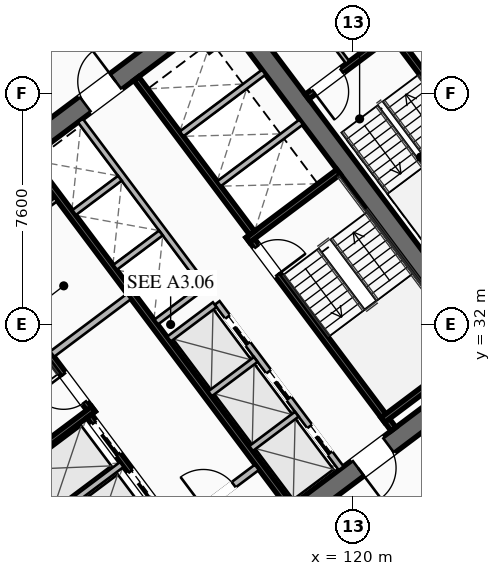
"""IFC4 building model, lengths in metres.
Left out: names, types, materials, properties, quantities, classifications, styles, units other than length and angle.
Written with IfcOpenShell. Run it as: python <this file> out.ifc"""

import sys

from ifc_helpers import new_model, si_unit, direction, frame, frame_2d, origin, place, context, subcontext, project, spatial, rectangle, extrude, element, fill, save


model = new_model("IFC4")
c1 = context("Model", 3, precision=1e-05, world=origin(), true_north=direction((0.0, 1.0)))
c2 = subcontext(c1, "Body", "Model", "MODEL_VIEW")
j1 = project(units=[si_unit("LENGTHUNIT", "METRE"), si_unit("PLANEANGLEUNIT", "RADIAN")], contexts=[c1])
p1 = place(None, origin())
s1 = spatial("IfcSite", under=j1, at=p1, CompositionType="ELEMENT")
p2 = place(p1, origin())
s2 = spatial("IfcBuilding", under=s1, at=p2, CompositionType="ELEMENT")
p3 = place(p2, frame((0.0, 0.0, 35.25)))
s3 = spatial("IfcBuildingStorey", under=s2, at=p3, CompositionType="ELEMENT", Elevation=35.25)
for number, where, z_axis, x_axis in (
    (1, (112.476, 21.107, 0.0), (0.0, 0.0, 1.0), (-0.6, 0.8, 0.0)),
    (2, (115.524, 42.893, 0.0), (0.0, 0.0, 1.0), (0.6, -0.8, 0.0)),
):
    element("IfcWall", number, at=place(p3, frame(where, z_axis=z_axis, x_axis=x_axis)), inside=s3, PredefinedType="SHEAR", context=c2, shape_type="SweptSolid", body=[
        extrude(rectangle(XDim=15.6, YDim=0.65, at=frame_2d((7.8, 0.0))), origin(), (0.0, 0.0, 1.0), 3.55),
    ])
p4 = place(p3, frame((124.429, 30.478, 0.0), z_axis=(0.0, 0.0, 1.0), x_axis=(-0.799998028465, -0.600002628705, 0.0)))
e3 = element("IfcWall", 3, at=p4, inside=s3, PredefinedType="SHEAR", context=c2, shape_type="SweptSolid", body=[
    extrude(rectangle(XDim=14.86, YDim=0.65, at=frame_2d((7.43, 0.0))), origin(), (0.0, 0.0, 1.0), 3.55),
])
p5 = place(p4, frame((9.13, 0.0, 0.0)))
e4 = element("IfcOpeningElement", 4, at=p5, cuts=e3, PredefinedType="OPENING", context=c2, shape_type="SweptSolid", body=[
    extrude(rectangle(XDim=1.25, YDim=2.25, at=frame_2d((0.625, 1.125))), frame((0.0, 0.335, 0.0), z_axis=(0.0, -1.0, 0.0), x_axis=(1.0, 0.0, 0.0)), (0.0, 0.0, 1.0), 0.67),
])
p6 = place(p4, frame((4.08, 0.0, 0.0)))
e5 = element("IfcOpeningElement", 5, at=p6, cuts=e3, PredefinedType="OPENING", context=c2, shape_type="SweptSolid", body=[
    extrude(rectangle(XDim=1.25, YDim=2.25, at=frame_2d((0.625, 1.125))), frame((0.0, 0.335, 0.0), z_axis=(0.0, -1.0, 0.0), x_axis=(1.0, 0.0, 0.0)), (0.0, 0.0, 1.0), 0.67),
])
p7 = place(p3, frame((103.571, 33.522, 0.0), z_axis=(0.0, 0.0, 1.0), x_axis=(0.799998028465, 0.600002628705, 0.0)))
e6 = element("IfcWall", 6, at=p7, inside=s3, PredefinedType="SHEAR", context=c2, shape_type="SweptSolid", body=[
    extrude(rectangle(XDim=14.86, YDim=0.65, at=frame_2d((7.43, 0.0))), origin(), (0.0, 0.0, 1.0), 3.55),
])
p8 = place(p7, frame((4.48, 0.0, 0.0)))
e7 = element("IfcOpeningElement", 7, at=p8, cuts=e6, PredefinedType="OPENING", context=c2, shape_type="SweptSolid", body=[
    extrude(rectangle(XDim=1.25, YDim=2.25, at=frame_2d((0.625, 1.125))), frame((0.0, 0.335, 0.0), z_axis=(0.0, -1.0, 0.0), x_axis=(1.0, 0.0, 0.0)), (0.0, 0.0, 1.0), 0.67),
])
p9 = place(p7, frame((9.53, 0.0, 0.0)))
e8 = element("IfcOpeningElement", 8, at=p9, cuts=e6, PredefinedType="OPENING", context=c2, shape_type="SweptSolid", body=[
    extrude(rectangle(XDim=1.25, YDim=2.25, at=frame_2d((0.625, 1.125))), frame((0.0, 0.335, 0.0), z_axis=(0.0, -1.0, 0.0), x_axis=(1.0, 0.0, 0.0)), (0.0, 0.0, 1.0), 0.67),
])
p10 = place(p3, frame((111.44, 29.08, 0.0), z_axis=(0.0, 0.0, 1.0), x_axis=(-0.600009827119, 0.799992629566, 0.0)))
e9 = element("IfcWall", 9, at=p10, inside=s3, PredefinedType="SHEAR", context=c2, shape_type="SweptSolid", body=[
    extrude(rectangle(XDim=7.95, YDim=0.2, at=frame_2d((3.975, 0.0))), origin(), (0.0, 0.0, 1.0), 3.35),
])
p11 = place(p10, frame((0.45, 0.0, 0.0)))
e10 = element("IfcOpeningElement", 10, at=p11, cuts=e9, PredefinedType="OPENING", context=c2, shape_type="SweptSolid", body=[
    extrude(rectangle(XDim=1.15, YDim=2.2, at=frame_2d((0.575, 1.1))), frame((0.0, 0.11, 0.0), z_axis=(0.0, -1.0, 0.0), x_axis=(1.0, 0.0, 0.0)), (0.0, 0.0, 1.0), 0.22),
])
p12 = place(p3, frame((108.476, 26.982, 0.0), z_axis=(0.0, 0.0, 1.0), x_axis=(0.799984290658, 0.600020945218, 0.0)))
e11 = element("IfcWall", 11, at=p12, inside=s3, PredefinedType="SHEAR", context=c2, shape_type="SweptSolid", body=[
    extrude(rectangle(XDim=3.73, YDim=0.2, at=frame_2d((1.865, 0.0))), origin(), (0.0, 0.0, 1.0), 3.35),
])
p13 = place(p3, frame((116.56, 34.92, 0.0), z_axis=(0.0, 0.0, 1.0), x_axis=(0.600009827119, -0.799992629566, 0.0)))
e12 = element("IfcWall", 12, at=p13, inside=s3, PredefinedType="SHEAR", context=c2, shape_type="SweptSolid", body=[
    extrude(rectangle(XDim=7.95, YDim=0.2, at=frame_2d((3.975, 0.0))), origin(), (0.0, 0.0, 1.0), 3.35),
])
p14 = place(p13, frame((0.45, 0.0, 0.0)))
e13 = element("IfcOpeningElement", 13, at=p14, cuts=e12, PredefinedType="OPENING", context=c2, shape_type="SweptSolid", body=[
    extrude(rectangle(XDim=1.15, YDim=2.2, at=frame_2d((0.575, 1.1))), frame((0.0, 0.11, 0.0), z_axis=(0.0, -1.0, 0.0), x_axis=(1.0, 0.0, 0.0)), (0.0, 0.0, 1.0), 0.22),
])
for number, where, z_axis, x_axis in (
    (14, (116.54, 34.78, 0.0), (0.0, 0.0, 1.0), (0.8, 0.6, 0.0)),
    (15, (120.98, 28.86, 0.0), (0.0, 0.0, 1.0), (0.8, 0.6, 0.0)),
):
    element("IfcWall", number, at=place(p3, frame(where, z_axis=z_axis, x_axis=x_axis)), inside=s3, PredefinedType="SHEAR", context=c2, shape_type="SweptSolid", body=[
        extrude(rectangle(XDim=3.73, YDim=0.2, at=frame_2d((1.865, 0.0))), origin(), (0.0, 0.0, 1.0), 3.35),
    ])
p15 = place(p3, frame((117.938, 26.016, 0.0), z_axis=(0.0, 0.0, 1.0), x_axis=(-0.600005463273, 0.799995902516, 0.0)))
e16 = element("IfcWall", 16, at=p15, inside=s3, PredefinedType="SHEAR", context=c2, shape_type="SweptSolid", body=[
    extrude(rectangle(XDim=14.3, YDim=0.2, at=frame_2d((7.15, 0.0))), origin(), (0.0, 0.0, 1.0), 3.35),
])
p16 = place(p3, frame((110.104, 31.028, 0.0), z_axis=(0.0, 0.0, 1.0), x_axis=(0.800018601094, 0.59997519774, 0.0)))
e17 = element("IfcWall", 17, at=p16, inside=s3, PredefinedType="SOLIDWALL", context=c2, shape_type="SweptSolid", body=[
    extrude(rectangle(XDim=3.15, YDim=0.22, at=frame_2d((1.575, 0.0))), origin(), (0.0, 0.0, 1.0), 2.703),
])
p17 = place(p3, frame((114.316, 25.412, 0.0), z_axis=(0.0, 0.0, 1.0), x_axis=(0.800018601094, 0.59997519774, 0.0)))
e18 = element("IfcWall", 18, at=p17, inside=s3, PredefinedType="SOLIDWALL", context=c2, shape_type="SweptSolid", body=[
    extrude(rectangle(XDim=3.15, YDim=0.22, at=frame_2d((1.575, 0.0))), origin(), (0.0, 0.0, 1.0), 2.703),
])
p18 = place(p17, frame((0.95, 0.0, 0.0)))
e19 = element("IfcOpeningElement", 19, at=p18, cuts=e18, PredefinedType="OPENING", context=c2, shape_type="SweptSolid", body=[
    extrude(rectangle(XDim=1.25, YDim=2.25, at=frame_2d((0.625, 1.125))), frame((0.0, 0.12, 0.0), z_axis=(0.0, -1.0, 0.0), x_axis=(1.0, 0.0, 0.0)), (0.0, 0.0, 1.0), 0.24),
])
p19 = place(p3, frame((115.13, 23.91, 0.0), z_axis=(0.0, 0.0, 1.0), x_axis=(-0.599975393228, 0.800018454488, 0.0)))
e20 = element("IfcWall", 20, at=p19, inside=s3, PredefinedType="SHEAR", context=c2, shape_type="SweptSolid", body=[
    extrude(rectangle(XDim=6.35, YDim=0.2, at=frame_2d((3.175, 0.0))), origin(), (0.0, 0.0, 1.0), 3.35),
])
p20 = place(p19, frame((4.775, 0.0, 0.0)))
e21 = element("IfcOpeningElement", 21, at=p20, cuts=e20, PredefinedType="OPENING", context=c2, shape_type="SweptSolid", body=[
    extrude(rectangle(XDim=1.3, YDim=2.25, at=frame_2d((0.65, 1.125))), frame((0.0, 0.11, 0.0), z_axis=(0.0, -1.0, 0.0), x_axis=(1.0, 0.0, 0.0)), (0.0, 0.0, 1.0), 0.22),
])
p21 = place(p19, frame((2.775, 0.0, 0.0)))
e22 = element("IfcOpeningElement", 22, at=p21, cuts=e20, PredefinedType="OPENING", context=c2, shape_type="SweptSolid", body=[
    extrude(rectangle(XDim=1.3, YDim=2.25, at=frame_2d((0.65, 1.125))), frame((0.0, 0.11, 0.0), z_axis=(0.0, -1.0, 0.0), x_axis=(1.0, 0.0, 0.0)), (0.0, 0.0, 1.0), 0.22),
])
p22 = place(p19, frame((0.575, 0.0, 0.0)))
e23 = element("IfcOpeningElement", 23, at=p22, cuts=e20, PredefinedType="OPENING", context=c2, shape_type="SweptSolid", body=[
    extrude(rectangle(XDim=1.3, YDim=2.25, at=frame_2d((0.65, 1.125))), frame((0.0, 0.11, 0.0), z_axis=(0.0, -1.0, 0.0), x_axis=(1.0, 0.0, 0.0)), (0.0, 0.0, 1.0), 0.22),
])
p23 = place(p3, frame((109.688, 25.366, 0.0), z_axis=(0.0, 0.0, 1.0), x_axis=(0.8, 0.6, 0.0)))
e24 = element("IfcWall", 24, at=p23, inside=s3, PredefinedType="SOLIDWALL", context=c2, shape_type="SweptSolid", body=[
    extrude(rectangle(XDim=3.38, YDim=0.2, at=frame_2d((1.69, 0.0))), origin(), (0.0, 0.0, 1.0), 3.35),
])
p24 = place(p3, frame((112.87, 40.09, 0.0), z_axis=(0.0, 0.0, 1.0), x_axis=(0.599975393228, -0.800018454488, 0.0)))
e25 = element("IfcWall", 25, at=p24, inside=s3, PredefinedType="SHEAR", context=c2, shape_type="SweptSolid", body=[
    extrude(rectangle(XDim=6.35, YDim=0.2, at=frame_2d((3.175, 0.0))), origin(), (0.0, 0.0, 1.0), 3.35),
])
for number, where, z_axis, x_axis in (
    (26, (115.59, 36.63, 0.0), (0.0, 0.0, 1.0), (0.8, 0.6, 0.0)),
    (27, (114.36, 38.27, 0.0), (0.0, 0.0, 1.0), (0.8, 0.6, 0.0)),
):
    element("IfcWall", number, at=place(p3, frame(where, z_axis=z_axis, x_axis=x_axis)), inside=s3, PredefinedType="SOLIDWALL", context=c2, shape_type="SweptSolid", body=[
        extrude(rectangle(XDim=3.38, YDim=0.2, at=frame_2d((1.69, 0.0))), origin(), (0.0, 0.0, 1.0), 3.35),
    ])
p25 = place(p3, frame((107.71, 34.22, 0.0), z_axis=(0.0, 0.0, 1.0), x_axis=(0.799981399002, 0.60002480053, 0.0)))
e28 = element("IfcWall", 28, at=p25, inside=s3, PredefinedType="PARTITIONING", context=c2, shape_type="SweptSolid", body=[
    extrude(rectangle(XDim=3.15, YDim=0.135, at=frame_2d((1.575, 0.0))), origin(), (0.0, 0.0, 1.0), 2.703),
])
p26 = place(p25, frame((1.05, 0.0, 0.0)))
e29 = element("IfcOpeningElement", 29, at=p26, cuts=e28, PredefinedType="OPENING", context=c2, shape_type="SweptSolid", body=[
    extrude(rectangle(XDim=1.05, YDim=2.2, at=frame_2d((0.525, 1.1))), frame((0.0, 0.077, 0.0), z_axis=(0.0, -1.0, 0.0), x_axis=(1.0, 0.0, 0.0)), (0.0, 0.0, 1.0), 0.155),
])
p27 = place(p3, frame((119.61, 27.27, 0.0), z_axis=(0.0, 0.0, 1.0), x_axis=(-0.600011488909, 0.79999138319, 0.0)))
e30 = element("IfcWall", 30, at=p27, inside=s3, PredefinedType="SOLIDWALL", context=c2, shape_type="SweptSolid", body=[
    extrude(rectangle(XDim=6.8, YDim=0.2, at=frame_2d((3.4, 0.0))), origin(), (0.0, 0.0, 1.0), 3.35),
])
p28 = place(p27, frame((0.625, 0.0, 0.0)))
e31 = element("IfcOpeningElement", 31, at=p28, cuts=e30, PredefinedType="OPENING", context=c2, shape_type="SweptSolid", body=[
    extrude(rectangle(XDim=1.1, YDim=2.2, at=frame_2d((0.55, 1.1))), frame((0.0, 0.11, 0.0), z_axis=(0.0, -1.0, 0.0), x_axis=(1.0, 0.0, 0.0)), (0.0, 0.0, 1.0), 0.22),
])
p29 = place(p27, frame((2.875, 0.0, 0.0)))
e32 = element("IfcOpeningElement", 32, at=p29, cuts=e30, PredefinedType="OPENING", context=c2, shape_type="SweptSolid", body=[
    extrude(rectangle(XDim=1.1, YDim=2.2, at=frame_2d((0.55, 1.1))), frame((0.0, 0.11, 0.0), z_axis=(0.0, -1.0, 0.0), x_axis=(1.0, 0.0, 0.0)), (0.0, 0.0, 1.0), 0.22),
])
p30 = place(p27, frame((5.125, 0.0, 0.0)))
e33 = element("IfcOpeningElement", 33, at=p30, cuts=e30, PredefinedType="OPENING", context=c2, shape_type="SweptSolid", body=[
    extrude(rectangle(XDim=1.1, YDim=2.2, at=frame_2d((0.55, 1.1))), frame((0.0, 0.11, 0.0), z_axis=(0.0, -1.0, 0.0), x_axis=(1.0, 0.0, 0.0)), (0.0, 0.0, 1.0), 0.22),
])
p31 = place(p3, frame((116.646, 27.922, 0.0), z_axis=(0.0, 0.0, 1.0), x_axis=(0.8, 0.6, 0.0)))
e34 = element("IfcWall", 34, at=p31, inside=s3, PredefinedType="SOLIDWALL", context=c2, shape_type="SweptSolid", body=[
    extrude(rectangle(XDim=1.88, YDim=0.2, at=frame_2d((0.94, 0.0))), origin(), (0.0, 0.0, 1.0), 3.35),
])
p32 = place(p3, frame((115.296, 29.722, 0.0), z_axis=(0.0, 0.0, 1.0), x_axis=(0.799984418148, 0.600020775241, 0.0)))
e35 = element("IfcWall", 35, at=p32, inside=s3, PredefinedType="SOLIDWALL", context=c2, shape_type="SweptSolid", body=[
    extrude(rectangle(XDim=1.88, YDim=0.2, at=frame_2d((0.94, 0.0))), origin(), (0.0, 0.0, 1.0), 3.35),
])
p33 = place(p3, frame((113.946, 31.522, 0.0), z_axis=(0.0, 0.0, 1.0), x_axis=(0.8, 0.6, 0.0)))
e36 = element("IfcWall", 36, at=p33, inside=s3, PredefinedType="SOLIDWALL", context=c2, shape_type="SweptSolid", body=[
    extrude(rectangle(XDim=1.88, YDim=0.2, at=frame_2d((0.94, 0.0))), origin(), (0.0, 0.0, 1.0), 3.35),
])
p34 = place(p3, frame((115.11, 33.27, 0.0), z_axis=(0.0, 0.0, 1.0), x_axis=(-0.600011488909, 0.79999138319, 0.0)))
e37 = element("IfcWall", 37, at=p34, inside=s3, PredefinedType="SOLIDWALL", context=c2, shape_type="SweptSolid", body=[
    extrude(rectangle(XDim=6.8, YDim=0.2, at=frame_2d((3.4, 0.0))), origin(), (0.0, 0.0, 1.0), 3.35),
])
p35 = place(p3, frame((113.526, 32.082, 0.0), z_axis=(0.0, 0.0, 1.0), x_axis=(0.800046745961, 0.599937666993, 0.0)))
e38 = element("IfcWall", 38, at=p35, inside=s3, PredefinedType="SOLIDWALL", context=c2, shape_type="SweptSolid", body=[
    extrude(rectangle(XDim=1.88, YDim=0.2, at=frame_2d((0.94, 0.0))), origin(), (0.0, 0.0, 1.0), 3.35),
])
p36 = place(p3, frame((112.176, 33.882, 0.0), z_axis=(0.0, 0.0, 1.0), x_axis=(0.8, 0.6, 0.0)))
e39 = element("IfcWall", 39, at=p36, inside=s3, PredefinedType="SOLIDWALL", context=c2, shape_type="SweptSolid", body=[
    extrude(rectangle(XDim=1.88, YDim=0.2, at=frame_2d((0.94, 0.0))), origin(), (0.0, 0.0, 1.0), 3.35),
])
p37 = place(p3, frame((110.826, 35.682, 0.0), z_axis=(0.0, 0.0, 1.0), x_axis=(0.799984418148, 0.600020775241, 0.0)))
e40 = element("IfcWall", 40, at=p37, inside=s3, PredefinedType="SOLIDWALL", context=c2, shape_type="SweptSolid", body=[
    extrude(rectangle(XDim=1.88, YDim=0.2, at=frame_2d((0.94, 0.0))), origin(), (0.0, 0.0, 1.0), 3.35),
])
p38 = place(p3, frame((125.304, 36.228, 0.0), z_axis=(0.0, 0.0, 1.0), x_axis=(-0.59998851072, 0.800008616831, 0.0)))
e41 = element("IfcWall", 41, at=p38, inside=s3, PredefinedType="SHEAR", context=c2, shape_type="SweptSolid", body=[
    extrude(rectangle(XDim=6.8, YDim=0.2, at=frame_2d((3.4, 0.0))), origin(), (0.0, 0.0, 1.0), 3.35),
])
p39 = place(p3, frame((121.204, 41.528, 0.0), z_axis=(0.0, 0.0, 1.0), x_axis=(-0.800017232136, -0.599977023131, 0.0)))
e42 = element("IfcWall", 42, at=p39, inside=s3, PredefinedType="SHEAR", context=c2, shape_type="SweptSolid", body=[
    extrude(rectangle(XDim=3.4, YDim=0.2, at=frame_2d((1.7, 0.0))), origin(), (0.0, 0.0, 1.0), 3.35),
])
p40 = place(p39, frame((1.975, 0.0, 0.0)))
e43 = element("IfcOpeningElement", 43, at=p40, cuts=e42, PredefinedType="OPENING", context=c2, shape_type="SweptSolid", body=[
    extrude(rectangle(XDim=1.15, YDim=2.2, at=frame_2d((0.575, 1.1))), frame((0.0, 0.11, 0.0), z_axis=(0.0, -1.0, 0.0), x_axis=(1.0, 0.0, 0.0)), (0.0, 0.0, 1.0), 0.22),
])
p41 = place(p3, frame((119.824, 40.618, 0.0), z_axis=(0.0, 0.0, 1.0), x_axis=(-0.599982243973, 0.800013316712, 0.0)))
e44 = element("IfcWall", 44, at=p41, inside=s3, PredefinedType="PARTITIONING", context=c2, shape_type="SweptSolid", body=[
    extrude(rectangle(XDim=4.4, YDim=0.135, at=frame_2d((2.2, 0.0))), origin(), (0.0, 0.0, 1.0), 2.703),
])
p42 = place(p3, frame((98.516, 34.012, 0.0), z_axis=(0.0, 0.0, 1.0), x_axis=(0.799998035726, 0.600002619023, 0.0)))
e45 = element("IfcWall", 45, at=p42, inside=s3, PredefinedType="PARTITIONING", context=c2, shape_type="SweptSolid", body=[
    extrude(rectangle(XDim=29.83, YDim=0.135, at=frame_2d((14.915, 0.0))), origin(), (0.0, 0.0, 1.0), 2.703),
])
p43 = place(p42, frame((0.3, 0.0, 0.0)))
e46 = element("IfcOpeningElement", 46, at=p43, cuts=e45, PredefinedType="OPENING", context=c2, shape_type="SweptSolid", body=[
    extrude(rectangle(XDim=0.95, YDim=2.05, at=frame_2d((0.475, 1.025))), frame((0.0, 0.077, 0.0), z_axis=(0.0, -1.0, 0.0), x_axis=(1.0, 0.0, 0.0)), (0.0, 0.0, 1.0), 0.155),
])
p44 = place(p42, frame((10.829, 0.0, 0.0)))
e47 = element("IfcOpeningElement", 47, at=p44, cuts=e45, PredefinedType="OPENING", context=c2, shape_type="SweptSolid", body=[
    extrude(rectangle(XDim=0.95, YDim=2.05, at=frame_2d((0.475, 1.025))), frame((0.0, 0.077, 0.0), z_axis=(0.0, -1.0, 0.0), x_axis=(1.0, 0.0, 0.0)), (0.0, 0.0, 1.0), 0.155),
])
p45 = place(p42, frame((28.58, 0.0, 0.0)))
e48 = element("IfcOpeningElement", 48, at=p45, cuts=e45, PredefinedType="OPENING", context=c2, shape_type="SweptSolid", body=[
    extrude(rectangle(XDim=0.95, YDim=2.05, at=frame_2d((0.475, 1.025))), frame((0.0, 0.077, 0.0), z_axis=(0.0, -1.0, 0.0), x_axis=(1.0, 0.0, 0.0)), (0.0, 0.0, 1.0), 0.155),
])
p46 = place(p3, frame((135.67, 34.19, 0.0), z_axis=(0.0, 0.0, 1.0), x_axis=(-0.800000982127, -0.599998690494, 0.0)))
e49 = element("IfcWall", 49, at=p46, inside=s3, PredefinedType="PARTITIONING", context=c2, shape_type="SweptSolid", body=[
    extrude(rectangle(XDim=29.83, YDim=0.135, at=frame_2d((14.915, 0.0))), origin(), (0.0, 0.0, 1.0), 2.703),
])
p47 = place(p46, frame((28.5, 0.0, 0.0)))
e50 = element("IfcOpeningElement", 50, at=p47, cuts=e49, PredefinedType="OPENING", context=c2, shape_type="SweptSolid", body=[
    extrude(rectangle(XDim=0.95, YDim=2.05, at=frame_2d((0.475, 1.025))), frame((0.0, 0.077, 0.0), z_axis=(0.0, -1.0, 0.0), x_axis=(1.0, 0.0, 0.0)), (0.0, 0.0, 1.0), 0.155),
])
p48 = place(p46, frame((18.075, 0.0, 0.0)))
e51 = element("IfcOpeningElement", 51, at=p48, cuts=e49, PredefinedType="OPENING", context=c2, shape_type="SweptSolid", body=[
    extrude(rectangle(XDim=0.95, YDim=2.05, at=frame_2d((0.475, 1.025))), frame((0.0, 0.077, 0.0), z_axis=(0.0, -1.0, 0.0), x_axis=(1.0, 0.0, 0.0)), (0.0, 0.0, 1.0), 0.155),
])
p49 = place(p46, frame((0.38, 0.0, 0.0)))
e52 = element("IfcOpeningElement", 52, at=p49, cuts=e49, PredefinedType="OPENING", context=c2, shape_type="SweptSolid", body=[
    extrude(rectangle(XDim=0.95, YDim=2.05, at=frame_2d((0.475, 1.025))), frame((0.0, 0.077, 0.0), z_axis=(0.0, -1.0, 0.0), x_axis=(1.0, 0.0, 0.0)), (0.0, 0.0, 1.0), 0.155),
])
p50 = place(p3, frame((111.758, 16.356, 0.0), z_axis=(0.0, 0.0, 1.0), x_axis=(-0.600001776367, 0.799998667722, 0.0)))
e53 = element("IfcWall", 53, at=p50, inside=s3, PredefinedType="PARTITIONING", context=c2, shape_type="SweptSolid", body=[
    extrude(rectangle(XDim=21.99, YDim=0.135, at=frame_2d((10.995, 0.0))), origin(), (0.0, 0.0, 1.0), 2.703),
])
p51 = place(p50, frame((0.3, 0.0, 0.0)))
e54 = element("IfcOpeningElement", 54, at=p51, cuts=e53, PredefinedType="OPENING", context=c2, shape_type="SweptSolid", body=[
    extrude(rectangle(XDim=0.95, YDim=2.05, at=frame_2d((0.475, 1.025))), frame((0.0, 0.077, 0.0), z_axis=(0.0, -1.0, 0.0), x_axis=(1.0, 0.0, 0.0)), (0.0, 0.0, 1.0), 0.155),
])
p52 = place(p50, frame((10.952, 0.0, 0.0)))
e55 = element("IfcOpeningElement", 55, at=p52, cuts=e53, PredefinedType="OPENING", context=c2, shape_type="SweptSolid", body=[
    extrude(rectangle(XDim=0.95, YDim=2.05, at=frame_2d((0.475, 1.025))), frame((0.0, 0.077, 0.0), z_axis=(0.0, -1.0, 0.0), x_axis=(1.0, 0.0, 0.0)), (0.0, 0.0, 1.0), 0.155),
])
p53 = place(p50, frame((20.74, 0.0, 0.0)))
e56 = element("IfcOpeningElement", 56, at=p53, cuts=e53, PredefinedType="OPENING", context=c2, shape_type="SweptSolid", body=[
    extrude(rectangle(XDim=0.95, YDim=2.05, at=frame_2d((0.475, 1.025))), frame((0.0, 0.077, 0.0), z_axis=(0.0, -1.0, 0.0), x_axis=(1.0, 0.0, 0.0)), (0.0, 0.0, 1.0), 0.155),
])
p54 = place(p9, origin())
e57 = element("IfcDoor", 57, at=p54, inside=s3, OperationType="SINGLE_SWING_RIGHT", PredefinedType="DOOR", context=c2, shape_type="SweptSolid", body=[
    extrude(rectangle(XDim=1.25, YDim=2.25, at=frame_2d((0.625, 1.125))), frame((0.0, 0.025, 0.0), z_axis=(0.0, -1.0, 0.0), x_axis=(1.0, 0.0, 0.0)), (0.0, 0.0, 1.0), 0.05),
])
fill(e8, e57)
p55 = place(p6, origin())
e58 = element("IfcDoor", 58, at=p55, inside=s3, OperationType="SINGLE_SWING_RIGHT", PredefinedType="DOOR", context=c2, shape_type="SweptSolid", body=[
    extrude(rectangle(XDim=1.25, YDim=2.25, at=frame_2d((0.625, 1.125))), frame((0.0, 0.025, 0.0), z_axis=(0.0, -1.0, 0.0), x_axis=(1.0, 0.0, 0.0)), (0.0, 0.0, 1.0), 0.05),
])
fill(e5, e58)
p56 = place(p11, origin())
e59 = element("IfcDoor", 59, at=p56, inside=s3, OperationType="SINGLE_SWING_RIGHT", PredefinedType="DOOR", context=c2, shape_type="SweptSolid", body=[
    extrude(rectangle(XDim=1.15, YDim=2.2, at=frame_2d((0.575, 1.1))), frame((0.0, 0.025, 0.0), z_axis=(0.0, -1.0, 0.0), x_axis=(1.0, 0.0, 0.0)), (0.0, 0.0, 1.0), 0.05),
])
fill(e10, e59)
p57 = place(p14, origin())
e60 = element("IfcDoor", 60, at=p57, inside=s3, OperationType="SINGLE_SWING_RIGHT", PredefinedType="DOOR", context=c2, shape_type="SweptSolid", body=[
    extrude(rectangle(XDim=1.15, YDim=2.2, at=frame_2d((0.575, 1.1))), frame((0.0, 0.025, 0.0), z_axis=(0.0, -1.0, 0.0), x_axis=(1.0, 0.0, 0.0)), (0.0, 0.0, 1.0), 0.05),
])
fill(e13, e60)
p58 = place(p18, origin())
e61 = element("IfcDoor", 61, at=p58, inside=s3, OperationType="SINGLE_SWING_LEFT", PredefinedType="DOOR", context=c2, shape_type="SweptSolid", body=[
    extrude(rectangle(XDim=1.25, YDim=2.25, at=frame_2d((0.625, 1.125))), frame((0.0, 0.025, 0.0), z_axis=(0.0, -1.0, 0.0), x_axis=(1.0, 0.0, 0.0)), (0.0, 0.0, 1.0), 0.05),
])
fill(e19, e61)
p59 = place(p40, origin())
e62 = element("IfcDoor", 62, at=p59, inside=s3, OperationType="SINGLE_SWING_RIGHT", PredefinedType="DOOR", context=c2, shape_type="SweptSolid", body=[
    extrude(rectangle(XDim=1.15, YDim=2.2, at=frame_2d((0.575, 1.1))), frame((0.0, 0.025, 0.0), z_axis=(0.0, -1.0, 0.0), x_axis=(1.0, 0.0, 0.0)), (0.0, 0.0, 1.0), 0.05),
])
fill(e43, e62)
p60 = place(p20, origin())
e63 = element("IfcDoor", 63, at=p60, inside=s3, OperationType="SLIDING_TO_LEFT", PredefinedType="DOOR", context=c2, shape_type="SweptSolid", body=[
    extrude(rectangle(XDim=1.3, YDim=2.25, at=frame_2d((0.65, 1.125))), frame((0.0, 0.025, 0.0), z_axis=(0.0, -1.0, 0.0), x_axis=(1.0, 0.0, 0.0)), (0.0, 0.0, 1.0), 0.05),
])
fill(e21, e63)
p61 = place(p21, origin())
e64 = element("IfcDoor", 64, at=p61, inside=s3, OperationType="SLIDING_TO_LEFT", PredefinedType="DOOR", context=c2, shape_type="SweptSolid", body=[
    extrude(rectangle(XDim=1.3, YDim=2.25, at=frame_2d((0.65, 1.125))), frame((0.0, 0.025, 0.0), z_axis=(0.0, -1.0, 0.0), x_axis=(1.0, 0.0, 0.0)), (0.0, 0.0, 1.0), 0.05),
])
fill(e22, e64)
p62 = place(p28, origin())
e65 = element("IfcDoor", 65, at=p62, inside=s3, OperationType="SLIDING_TO_LEFT", PredefinedType="DOOR", context=c2, shape_type="SweptSolid", body=[
    extrude(rectangle(XDim=1.1, YDim=2.2, at=frame_2d((0.55, 1.1))), frame((0.0, 0.025, 0.0), z_axis=(0.0, -1.0, 0.0), x_axis=(1.0, 0.0, 0.0)), (0.0, 0.0, 1.0), 0.05),
])
fill(e31, e65)
p63 = place(p29, origin())
e66 = element("IfcDoor", 66, at=p63, inside=s3, OperationType="SLIDING_TO_LEFT", PredefinedType="DOOR", context=c2, shape_type="SweptSolid", body=[
    extrude(rectangle(XDim=1.1, YDim=2.2, at=frame_2d((0.55, 1.1))), frame((0.0, 0.025, 0.0), z_axis=(0.0, -1.0, 0.0), x_axis=(1.0, 0.0, 0.0)), (0.0, 0.0, 1.0), 0.05),
])
fill(e32, e66)
p64 = place(p30, origin())
e67 = element("IfcDoor", 67, at=p64, inside=s3, OperationType="SLIDING_TO_LEFT", PredefinedType="DOOR", context=c2, shape_type="SweptSolid", body=[
    extrude(rectangle(XDim=1.1, YDim=2.2, at=frame_2d((0.55, 1.1))), frame((0.0, 0.025, 0.0), z_axis=(0.0, -1.0, 0.0), x_axis=(1.0, 0.0, 0.0)), (0.0, 0.0, 1.0), 0.05),
])
fill(e33, e67)
save(model, sys.argv[1])
